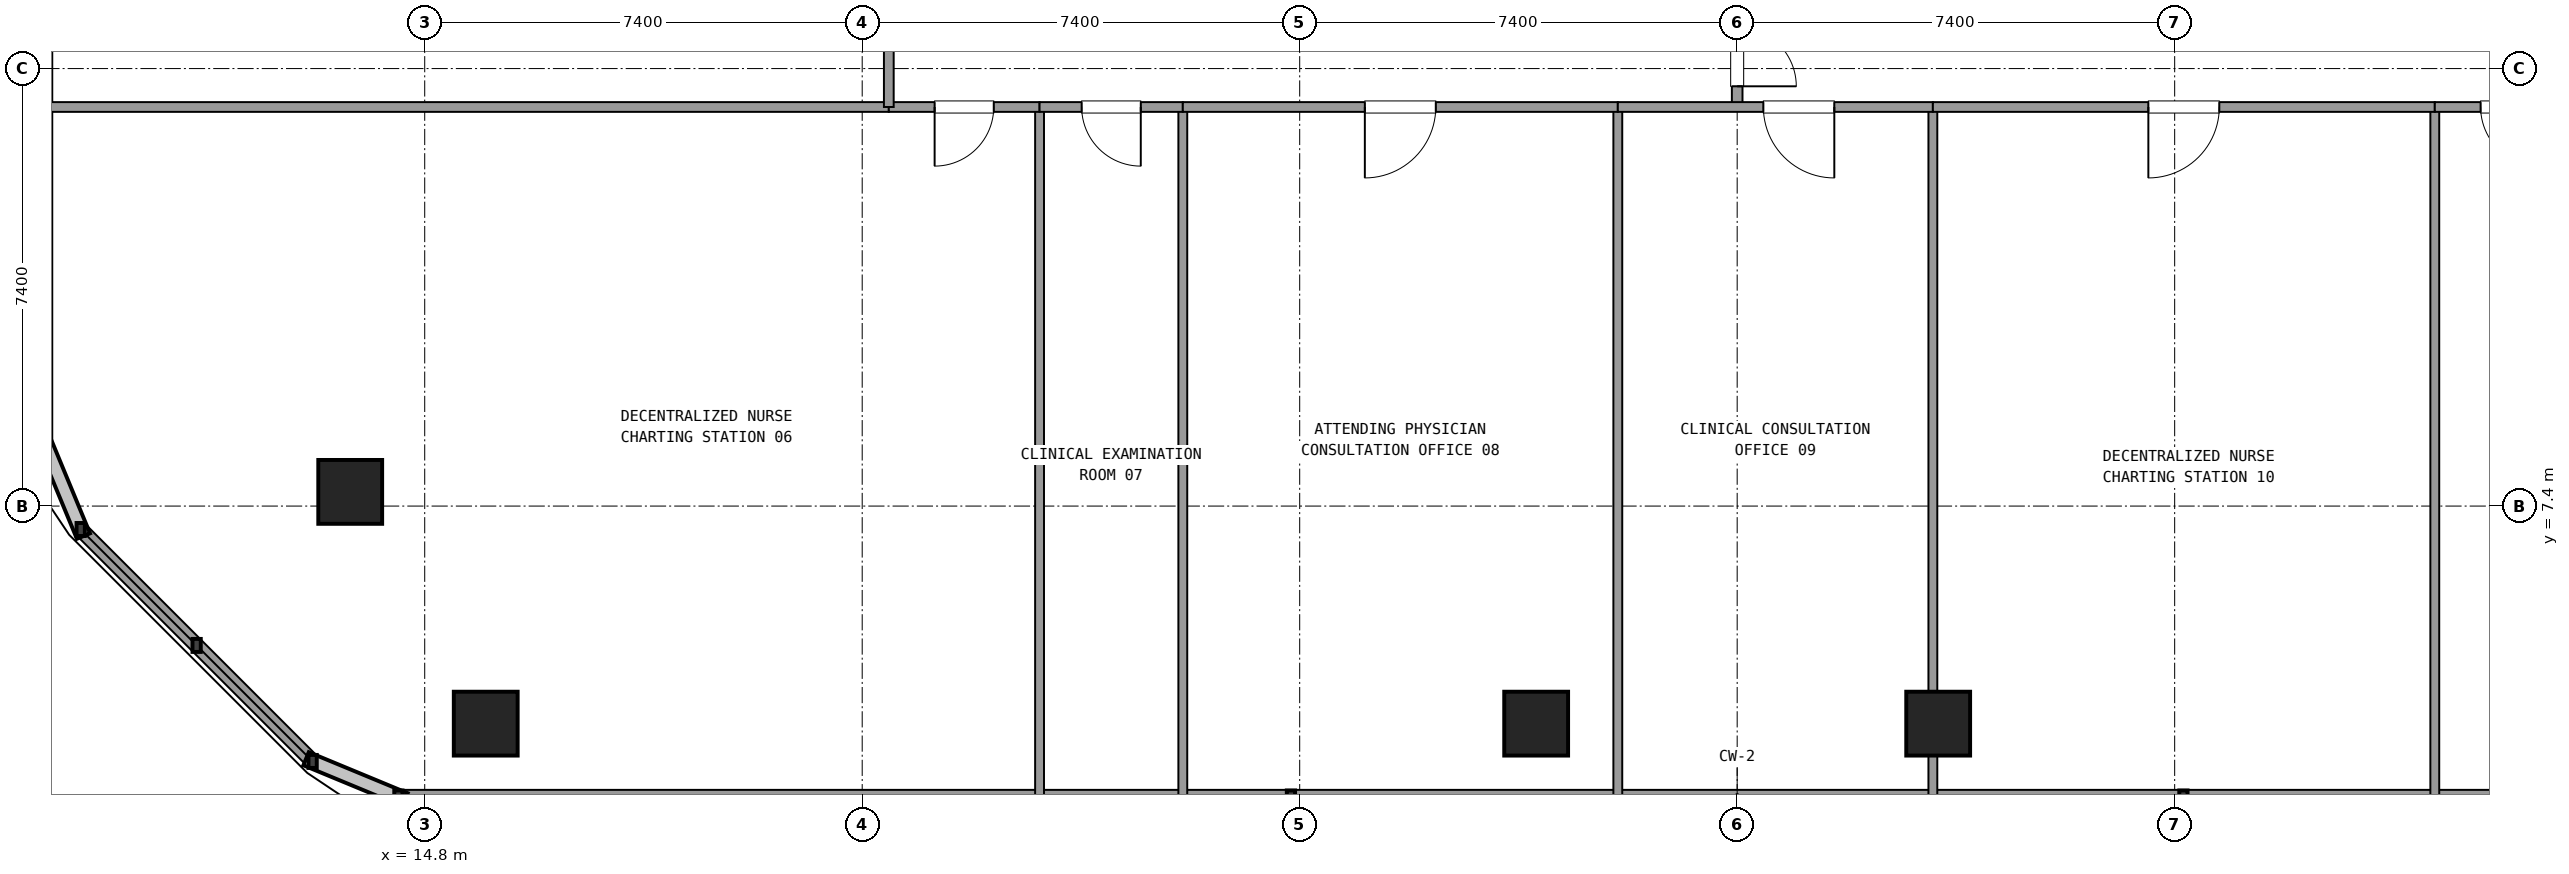
"""IFC4 building model, lengths in metres.
Left out: names, types, materials, properties, quantities, classifications, styles, units other than length and angle.
Written with IfcOpenShell. Run it as: python <this file> out.ifc"""

import sys

from ifc_helpers import new_model, si_unit, direction, frame, frame_2d, origin, origin_2d, place, context, subcontext, project, spatial, rectangle, extrude, element, fill, save


model = new_model("IFC4")
c1 = context("Model", 3, precision=1e-05, world=origin(), true_north=direction((0.0, 1.0)))
c2 = subcontext(c1, "Body", "Model", "MODEL_VIEW")
j1 = project(units=[si_unit("LENGTHUNIT", "METRE"), si_unit("PLANEANGLEUNIT", "RADIAN")], contexts=[c1])
p1 = place(None, origin())
s1 = spatial("IfcSite", under=j1, at=p1, CompositionType="ELEMENT")
p2 = place(p1, origin())
s2 = spatial("IfcBuilding", under=s1, at=p2, CompositionType="ELEMENT")
p3 = place(p2, frame((0.0, 0.0, 31.14)))
s3 = spatial("IfcBuildingStorey", under=s2, at=p3, CompositionType="ELEMENT", Elevation=31.14)
for number, where, z_axis, x_axis in (
    (1, (13.54, 7.64, 0.0), (0.0, 0.0, 1.0), (1.0, 0.0, 0.0)),
    (2, (15.832, 3.72, 0.0), (0.0, 0.0, 1.0), (1.0, 0.0, 0.0)),
    (3, (33.6, 3.72, 0.0), (0.0, 0.0, 1.0), (1.0, 0.0, 0.0)),
    (4, (40.4, 3.72, 0.0), (0.0, 0.0, 1.0), (1.0, 0.0, 0.0)),
):
    element("IfcColumn", number, at=place(p3, frame(where, z_axis=z_axis, x_axis=x_axis)), inside=s3, PredefinedType="COLUMN", context=c2, shape_type="SweptSolid", body=[
        extrude(rectangle(XDim=1.08, YDim=1.08, at=origin_2d()), origin(), (0.0, 0.0, 1.0), 3.6),
    ])
p4 = place(p3, frame((14.355, 2.48, 0.0), z_axis=(0.0, 0.0, 1.0), x_axis=(1.0, 0.0, 0.0)))
e5 = element("IfcWall", 5, at=p4, inside=s3, PredefinedType="SOLIDWALL", context=c2, shape_type="SweptSolid", body=[
    extrude(rectangle(XDim=45.29, YDim=0.24, at=frame_2d((22.645, 0.0))), origin(), (0.0, 0.0, 1.0), 0.85),
])
p5 = place(p3, frame((8.981, 7.004, 0.0), z_axis=(0.0, 0.0, 1.0), x_axis=(0.707128783731, -0.707084777957, 0.0)))
e6 = element("IfcWall", 6, at=p5, inside=s3, PredefinedType="SOLIDWALL", context=c2, shape_type="SweptSolid", body=[
    extrude(rectangle(XDim=5.548, YDim=0.24, at=frame_2d((2.774, 0.0))), origin(), (0.0, 0.0, 1.0), 0.85),
])
p6 = place(p3, frame((37.0, 14.15, 0.0), z_axis=(0.0, 0.0, 1.0), x_axis=(0.0, 1.0, 0.0)))
e7 = element("IfcWall", 7, at=p6, inside=s3, PredefinedType="PARTITIONING", context=c2, shape_type="SweptSolid", body=[
    extrude(rectangle(XDim=2.7, YDim=0.18, at=frame_2d((1.35, 0.0))), origin(), (0.0, 0.0, 1.0), 2.61),
])
p7 = place(p6, frame((0.35, 0.0, 0.0)))
e8 = element("IfcOpeningElement", 8, at=p7, cuts=e7, PredefinedType="OPENING", context=c2, shape_type="SweptSolid", body=[
    extrude(rectangle(XDim=2.0, YDim=2.2, at=frame_2d((1.0, 1.1))), frame((0.0, 0.1, 0.0), z_axis=(0.0, -1.0, 0.0), x_axis=(1.0, 0.0, 0.0)), (0.0, 0.0, 1.0), 0.2),
])
p8 = place(p3, frame((8.4, 14.15, 0.0), z_axis=(0.0, 0.0, 1.0), x_axis=(1.0, 0.0, 0.0)))
e9 = element("IfcWall", 9, at=p8, inside=s3, PredefinedType="PARTITIONING", context=c2, shape_type="SweptSolid", body=[
    extrude(rectangle(XDim=14.25, YDim=0.165, at=frame_2d((7.125, 0.0))), origin(), (0.0, 0.0, 1.0), 2.61),
])
p9 = place(p3, frame((25.2, 14.15, 0.0), z_axis=(0.0, 0.0, 1.0), x_axis=(0.0, -1.0, 0.0)))
e10 = element("IfcWall", 10, at=p9, inside=s3, PredefinedType="PARTITIONING", context=c2, shape_type="SweptSolid", body=[
    extrude(rectangle(XDim=11.65, YDim=0.15, at=frame_2d((5.825, 0.0))), origin(), (0.0, 0.0, 1.0), 2.61),
])
p10 = place(p3, frame((22.65, 14.15, 0.0), z_axis=(0.0, 0.0, 1.0), x_axis=(1.0, 0.0, 0.0)))
e11 = element("IfcWall", 11, at=p10, inside=s3, PredefinedType="PARTITIONING", context=c2, shape_type="SweptSolid", body=[
    extrude(rectangle(XDim=2.55, YDim=0.165, at=frame_2d((1.275, 0.0))), origin(), (0.0, 0.0, 1.0), 2.61),
])
p11 = place(p10, frame((0.775, 0.0, 0.0)))
e12 = element("IfcOpeningElement", 12, at=p11, cuts=e11, PredefinedType="OPENING", context=c2, shape_type="SweptSolid", body=[
    extrude(rectangle(XDim=1.0, YDim=2.15, at=frame_2d((0.5, 1.075))), frame((0.0, 0.093, 0.0), z_axis=(0.0, -1.0, 0.0), x_axis=(1.0, 0.0, 0.0)), (0.0, 0.0, 1.0), 0.185),
])
p12 = place(p3, frame((27.623, 14.15, 0.0), z_axis=(0.0, 0.0, 1.0), x_axis=(0.0, -1.0, 0.0)))
e13 = element("IfcWall", 13, at=p12, inside=s3, PredefinedType="PARTITIONING", context=c2, shape_type="SweptSolid", body=[
    extrude(rectangle(XDim=11.65, YDim=0.15, at=frame_2d((5.825, 0.0))), origin(), (0.0, 0.0, 1.0), 2.61),
])
p13 = place(p3, frame((25.2, 14.15, 0.0), z_axis=(0.0, 0.0, 1.0), x_axis=(1.0, 0.0, 0.0)))
e14 = element("IfcWall", 14, at=p13, inside=s3, PredefinedType="PARTITIONING", context=c2, shape_type="SweptSolid", body=[
    extrude(rectangle(XDim=2.423, YDim=0.165, at=frame_2d((1.211, 0.0))), origin(), (0.0, 0.0, 1.0), 2.61),
])
p14 = place(p13, frame((0.712, 0.0, 0.0)))
e15 = element("IfcOpeningElement", 15, at=p14, cuts=e14, PredefinedType="OPENING", context=c2, shape_type="SweptSolid", body=[
    extrude(rectangle(XDim=1.0, YDim=2.15, at=frame_2d((0.5, 1.075))), frame((0.0, 0.093, 0.0), z_axis=(0.0, -1.0, 0.0), x_axis=(1.0, 0.0, 0.0)), (0.0, 0.0, 1.0), 0.185),
])
p15 = place(p3, frame((34.981, 14.15, 0.0), z_axis=(0.0, 0.0, 1.0), x_axis=(0.0, -1.0, 0.0)))
e16 = element("IfcWall", 16, at=p15, inside=s3, PredefinedType="PARTITIONING", context=c2, shape_type="SweptSolid", body=[
    extrude(rectangle(XDim=11.65, YDim=0.15, at=frame_2d((5.825, 0.0))), origin(), (0.0, 0.0, 1.0), 2.61),
])
p16 = place(p3, frame((27.623, 14.15, 0.0), z_axis=(0.0, 0.0, 1.0), x_axis=(1.0, 0.0, 0.0)))
e17 = element("IfcWall", 17, at=p16, inside=s3, PredefinedType="PARTITIONING", context=c2, shape_type="SweptSolid", body=[
    extrude(rectangle(XDim=7.358, YDim=0.165, at=frame_2d((3.679, 0.0))), origin(), (0.0, 0.0, 1.0), 2.61),
])
p17 = place(p16, frame((3.079, 0.0, 0.0)))
e18 = element("IfcOpeningElement", 18, at=p17, cuts=e17, PredefinedType="OPENING", context=c2, shape_type="SweptSolid", body=[
    extrude(rectangle(XDim=1.2, YDim=2.15, at=frame_2d((0.6, 1.075))), frame((0.0, 0.093, 0.0), z_axis=(0.0, -1.0, 0.0), x_axis=(1.0, 0.0, 0.0)), (0.0, 0.0, 1.0), 0.185),
])
p18 = place(p3, frame((40.31, 14.15, 0.0), z_axis=(0.0, 0.0, 1.0), x_axis=(0.0, -1.0, 0.0)))
e19 = element("IfcWall", 19, at=p18, inside=s3, PredefinedType="PARTITIONING", context=c2, shape_type="SweptSolid", body=[
    extrude(rectangle(XDim=11.65, YDim=0.15, at=frame_2d((5.825, 0.0))), origin(), (0.0, 0.0, 1.0), 2.61),
])
p19 = place(p3, frame((34.981, 14.15, 0.0), z_axis=(0.0, 0.0, 1.0), x_axis=(1.0, 0.0, 0.0)))
e20 = element("IfcWall", 20, at=p19, inside=s3, PredefinedType="PARTITIONING", context=c2, shape_type="SweptSolid", body=[
    extrude(rectangle(XDim=5.329, YDim=0.165, at=frame_2d((2.665, 0.0))), origin(), (0.0, 0.0, 1.0), 2.61),
])
p20 = place(p19, frame((2.462, 0.0, 0.0)))
e21 = element("IfcOpeningElement", 21, at=p20, cuts=e20, PredefinedType="OPENING", context=c2, shape_type="SweptSolid", body=[
    extrude(rectangle(XDim=1.2, YDim=2.15, at=frame_2d((0.6, 1.075))), frame((0.0, 0.093, 0.0), z_axis=(0.0, -1.0, 0.0), x_axis=(1.0, 0.0, 0.0)), (0.0, 0.0, 1.0), 0.185),
])
p21 = place(p3, frame((48.8, 14.15, 0.0), z_axis=(0.0, 0.0, 1.0), x_axis=(0.0, -1.0, 0.0)))
e22 = element("IfcWall", 22, at=p21, inside=s3, PredefinedType="PARTITIONING", context=c2, shape_type="SweptSolid", body=[
    extrude(rectangle(XDim=11.65, YDim=0.15, at=frame_2d((5.825, 0.0))), origin(), (0.0, 0.0, 1.0), 2.61),
])
p22 = place(p3, frame((40.31, 14.15, 0.0), z_axis=(0.0, 0.0, 1.0), x_axis=(1.0, 0.0, 0.0)))
e23 = element("IfcWall", 23, at=p22, inside=s3, PredefinedType="PARTITIONING", context=c2, shape_type="SweptSolid", body=[
    extrude(rectangle(XDim=8.49, YDim=0.165, at=frame_2d((4.245, 0.0))), origin(), (0.0, 0.0, 1.0), 2.61),
])
p23 = place(p22, frame((3.645, 0.0, 0.0)))
e24 = element("IfcOpeningElement", 24, at=p23, cuts=e23, PredefinedType="OPENING", context=c2, shape_type="SweptSolid", body=[
    extrude(rectangle(XDim=1.2, YDim=2.15, at=frame_2d((0.6, 1.075))), frame((0.0, 0.093, 0.0), z_axis=(0.0, -1.0, 0.0), x_axis=(1.0, 0.0, 0.0)), (0.0, 0.0, 1.0), 0.185),
])
p24 = place(p3, frame((48.8, 14.15, 0.0), z_axis=(0.0, 0.0, 1.0), x_axis=(1.0, 0.0, 0.0)))
e25 = element("IfcWall", 25, at=p24, inside=s3, PredefinedType="PARTITIONING", context=c2, shape_type="SweptSolid", body=[
    extrude(rectangle(XDim=2.55, YDim=0.165, at=frame_2d((1.275, 0.0))), origin(), (0.0, 0.0, 1.0), 2.61),
])
p25 = place(p24, frame((0.775, 0.0, 0.0)))
e26 = element("IfcOpeningElement", 26, at=p25, cuts=e25, PredefinedType="OPENING", context=c2, shape_type="SweptSolid", body=[
    extrude(rectangle(XDim=1.0, YDim=2.15, at=frame_2d((0.5, 1.075))), frame((0.0, 0.093, 0.0), z_axis=(0.0, -1.0, 0.0), x_axis=(1.0, 0.0, 0.0)), (0.0, 0.0, 1.0), 0.185),
])
p26 = place(p3, frame((22.65, 14.15, 0.0), z_axis=(0.0, 0.0, 1.0), x_axis=(0.0, 1.0, 0.0)))
e27 = element("IfcWall", 27, at=p26, inside=s3, PredefinedType="PARTITIONING", context=c2, shape_type="SweptSolid", body=[
    extrude(rectangle(XDim=8.46, YDim=0.165, at=frame_2d((4.23, 0.0))), origin(), (0.0, 0.0, 1.0), 2.61),
])
p27 = place(p26, frame((3.63, 0.0, 0.0)))
e28 = element("IfcOpeningElement", 28, at=p27, cuts=e27, PredefinedType="OPENING", context=c2, shape_type="SweptSolid", body=[
    extrude(rectangle(XDim=1.2, YDim=2.15, at=frame_2d((0.6, 1.075))), frame((0.0, 0.093, 0.0), z_axis=(0.0, -1.0, 0.0), x_axis=(1.0, 0.0, 0.0)), (0.0, 0.0, 1.0), 0.185),
])
p28 = place(p7, frame((2.0, 0.0, 0.0), z_axis=(0.0, 0.0, 1.0), x_axis=(-1.0, 0.0, 0.0)))
e29 = element("IfcDoor", 29, at=p28, inside=s3, OperationType="DOUBLE_DOOR_SINGLE_SWING", PredefinedType="DOOR", context=c2, shape_type="SweptSolid", body=[
    extrude(rectangle(XDim=2.0, YDim=2.2, at=frame_2d((1.0, 1.1))), frame((0.0, 0.025, 0.0), z_axis=(0.0, -1.0, 0.0), x_axis=(1.0, 0.0, 0.0)), (0.0, 0.0, 1.0), 0.05),
])
fill(e8, e29)
p29 = place(p11, frame((1.0, 0.0, 0.0), z_axis=(0.0, 0.0, 1.0), x_axis=(-1.0, 0.0, 0.0)))
e30 = element("IfcDoor", 30, at=p29, inside=s3, OperationType="SINGLE_SWING_LEFT", PredefinedType="DOOR", context=c2, shape_type="SweptSolid", body=[
    extrude(rectangle(XDim=1.0, YDim=2.15, at=frame_2d((0.5, 1.075))), frame((0.0, 0.025, 0.0), z_axis=(0.0, -1.0, 0.0), x_axis=(1.0, 0.0, 0.0)), (0.0, 0.0, 1.0), 0.05),
])
fill(e12, e30)
p30 = place(p14, frame((1.0, 0.0, 0.0), z_axis=(0.0, 0.0, 1.0), x_axis=(-1.0, 0.0, 0.0)))
e31 = element("IfcDoor", 31, at=p30, inside=s3, OperationType="SINGLE_SWING_RIGHT", PredefinedType="DOOR", context=c2, shape_type="SweptSolid", body=[
    extrude(rectangle(XDim=1.0, YDim=2.15, at=frame_2d((0.5, 1.075))), frame((0.0, 0.025, 0.0), z_axis=(0.0, -1.0, 0.0), x_axis=(1.0, 0.0, 0.0)), (0.0, 0.0, 1.0), 0.05),
])
fill(e15, e31)
p31 = place(p17, frame((1.2, 0.0, 0.0), z_axis=(0.0, 0.0, 1.0), x_axis=(-1.0, 0.0, 0.0)))
e32 = element("IfcDoor", 32, at=p31, inside=s3, OperationType="SINGLE_SWING_LEFT", PredefinedType="DOOR", context=c2, shape_type="SweptSolid", body=[
    extrude(rectangle(XDim=1.2, YDim=2.15, at=frame_2d((0.6, 1.075))), frame((0.0, 0.025, 0.0), z_axis=(0.0, -1.0, 0.0), x_axis=(1.0, 0.0, 0.0)), (0.0, 0.0, 1.0), 0.05),
])
fill(e18, e32)
p32 = place(p20, frame((1.2, 0.0, 0.0), z_axis=(0.0, 0.0, 1.0), x_axis=(-1.0, 0.0, 0.0)))
e33 = element("IfcDoor", 33, at=p32, inside=s3, OperationType="SINGLE_SWING_RIGHT", PredefinedType="DOOR", context=c2, shape_type="SweptSolid", body=[
    extrude(rectangle(XDim=1.2, YDim=2.15, at=frame_2d((0.6, 1.075))), frame((0.0, 0.025, 0.0), z_axis=(0.0, -1.0, 0.0), x_axis=(1.0, 0.0, 0.0)), (0.0, 0.0, 1.0), 0.05),
])
fill(e21, e33)
p33 = place(p23, frame((1.2, 0.0, 0.0), z_axis=(0.0, 0.0, 1.0), x_axis=(-1.0, 0.0, 0.0)))
e34 = element("IfcDoor", 34, at=p33, inside=s3, OperationType="SINGLE_SWING_LEFT", PredefinedType="DOOR", context=c2, shape_type="SweptSolid", body=[
    extrude(rectangle(XDim=1.2, YDim=2.15, at=frame_2d((0.6, 1.075))), frame((0.0, 0.025, 0.0), z_axis=(0.0, -1.0, 0.0), x_axis=(1.0, 0.0, 0.0)), (0.0, 0.0, 1.0), 0.05),
])
fill(e24, e34)
p34 = place(p25, frame((1.0, 0.0, 0.0), z_axis=(0.0, 0.0, 1.0), x_axis=(-1.0, 0.0, 0.0)))
e35 = element("IfcDoor", 35, at=p34, inside=s3, OperationType="SINGLE_SWING_RIGHT", PredefinedType="DOOR", context=c2, shape_type="SweptSolid", body=[
    extrude(rectangle(XDim=1.0, YDim=2.15, at=frame_2d((0.5, 1.075))), frame((0.0, 0.025, 0.0), z_axis=(0.0, -1.0, 0.0), x_axis=(1.0, 0.0, 0.0)), (0.0, 0.0, 1.0), 0.05),
])
fill(e26, e35)
save(model, sys.argv[1])
